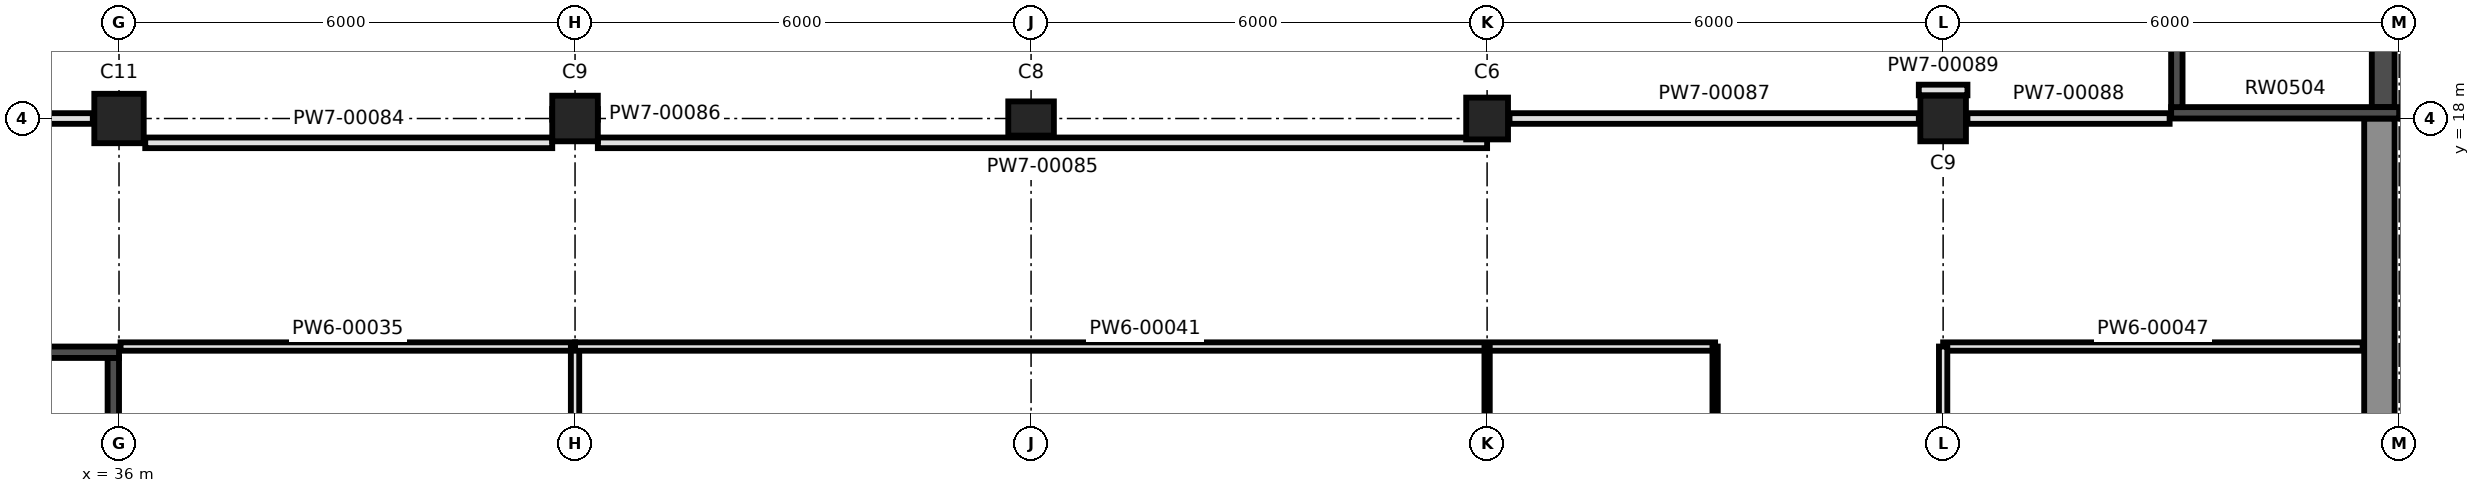
"""IFC4 building model, lengths in metres.
Left out: names, types, materials, properties, quantities, classifications, styles, units other than length and angle.
Written with IfcOpenShell. Run it as: python <this file> out.ifc"""

import sys

from ifc_helpers import new_model, si_unit, direction, frame, frame_2d, origin, origin_2d, place, context, subcontext, project, spatial, rectangle, extrude, element, fill, save


model = new_model("IFC4")
c1 = context("Model", 3, precision=1e-05, world=origin(), true_north=direction((0.0, 1.0)))
c2 = subcontext(c1, "Body", "Model", "MODEL_VIEW")
j1 = project(units=[si_unit("LENGTHUNIT", "METRE"), si_unit("PLANEANGLEUNIT", "RADIAN")], contexts=[c1])
p1 = place(None, origin())
s1 = spatial("IfcSite", under=j1, at=p1, CompositionType="ELEMENT")
p2 = place(p1, origin())
s2 = spatial("IfcBuilding", under=s1, at=p2, CompositionType="ELEMENT")
p3 = place(p2, origin())
s3 = spatial("IfcBuildingStorey", under=s2, at=p3, CompositionType="ELEMENT", Elevation=0.0)
p4 = place(p3, frame((36.0, 18.0, -0.3), z_axis=(0.0, 0.0, 1.0), x_axis=(1.0, 0.0, 0.0)))
e1 = element("IfcColumn", 1, at=p4, inside=s3, PredefinedType="COLUMN", context=c2, shape_type="SweptSolid", body=[
    extrude(rectangle(XDim=0.65, YDim=0.65, at=origin_2d()), origin(), (0.0, 0.0, 1.0), 7.3),
])
p5 = place(p3, frame((42.0, 18.0, -0.3), z_axis=(0.0, 0.0, 1.0), x_axis=(1.0, 0.0, 0.0)))
e2 = element("IfcColumn", 2, at=p5, inside=s3, PredefinedType="COLUMN", context=c2, shape_type="SweptSolid", body=[
    extrude(rectangle(XDim=0.6, YDim=0.6, at=origin_2d()), origin(), (0.0, 0.0, 1.0), 7.3),
])
p6 = place(p3, frame((48.0, 18.0, -0.3), z_axis=(0.0, 0.0, 1.0), x_axis=(1.0, 0.0, 0.0)))
e3 = element("IfcColumn", 3, at=p6, inside=s3, PredefinedType="COLUMN", context=c2, shape_type="SweptSolid", body=[
    extrude(rectangle(XDim=0.6, YDim=0.45, at=origin_2d()), origin(), (0.0, 0.0, 1.0), 7.3),
])
p7 = place(p3, frame((54.0, 18.0, -0.3), z_axis=(0.0, 0.0, 1.0), x_axis=(1.0, 0.0, 0.0)))
e4 = element("IfcColumn", 4, at=p7, inside=s3, PredefinedType="COLUMN", context=c2, shape_type="SweptSolid", body=[
    extrude(rectangle(XDim=0.55, YDim=0.55, at=origin_2d()), origin(), (0.0, 0.0, 1.0), 7.3),
])
p8 = place(p3, frame((60.0, 18.0, -0.3), z_axis=(0.0, 0.0, 1.0), x_axis=(1.0, 0.0, 0.0)))
e5 = element("IfcColumn", 5, at=p8, inside=s3, PredefinedType="COLUMN", context=c2, shape_type="SweptSolid", body=[
    extrude(rectangle(XDim=0.6, YDim=0.6, at=origin_2d()), origin(), (0.0, 0.0, 1.0), 7.3),
])
p9 = place(p3, frame((33.0, 14.925, -0.3), z_axis=(0.0, 0.0, 1.0), x_axis=(1.0, 0.0, 0.0)))
e6 = element("IfcWall", 6, at=p9, inside=s3, PredefinedType="SHEAR", context=c2, shape_type="SweptSolid", body=[
    extrude(rectangle(XDim=3.0, YDim=0.15, at=frame_2d((1.5, 0.0))), origin(), (0.0, 0.0, 1.0), 7.3),
])
p10 = place(p9, frame((1.15, 0.0, 0.3)))
e7 = element("IfcOpeningElement", 7, at=p10, cuts=e6, PredefinedType="OPENING", context=c2, shape_type="SweptSolid", body=[
    extrude(rectangle(XDim=0.6, YDim=2.04, at=frame_2d((0.3, 1.02))), frame((0.0, 0.085, 0.0), z_axis=(0.0, -1.0, 0.0), x_axis=(1.0, 0.0, 0.0)), (0.0, 0.0, 1.0), 0.17),
])
p11 = place(p3, frame((35.925, 12.15, -0.3), z_axis=(0.0, 0.0, 1.0), x_axis=(0.0, 1.0, 0.0)))
e8 = element("IfcWall", 8, at=p11, inside=s3, PredefinedType="SHEAR", context=c2, shape_type="SweptSolid", body=[
    extrude(rectangle(XDim=2.7, YDim=0.15, at=frame_2d((1.35, 0.0))), origin(), (0.0, 0.0, 1.0), 7.3),
])
p12 = place(p3, frame((63.0, 18.075, -0.3), z_axis=(0.0, 0.0, 1.0), x_axis=(1.0, 0.0, 0.0)))
e9 = element("IfcWall", 9, at=p12, inside=s3, PredefinedType="SHEAR", context=c2, shape_type="SweptSolid", body=[
    extrude(rectangle(XDim=3.0, YDim=0.15, at=frame_2d((1.5, 0.0))), origin(), (0.0, 0.0, 1.0), 7.3),
])
p13 = place(p3, frame((63.075, 18.15, -0.3), z_axis=(0.0, 0.0, 1.0), x_axis=(0.0, 1.0, 0.0)))
e10 = element("IfcWall", 10, at=p13, inside=s3, PredefinedType="SHEAR", context=c2, shape_type="SweptSolid", body=[
    extrude(rectangle(XDim=5.7, YDim=0.15, at=frame_2d((2.85, 0.0))), origin(), (0.0, 0.0, 1.0), 7.3),
])
p14 = place(p13, frame((2.5, 0.0, 0.3)))
e11 = element("IfcOpeningElement", 11, at=p14, cuts=e10, PredefinedType="OPENING", context=c2, shape_type="SweptSolid", body=[
    extrude(rectangle(XDim=0.6, YDim=2.04, at=frame_2d((0.3, 1.02))), frame((0.0, 0.085, 0.0), z_axis=(0.0, -1.0, 0.0), x_axis=(1.0, 0.0, 0.0)), (0.0, 0.0, 1.0), 0.17),
])
p15 = place(p3, frame((65.79, 18.15, -0.3), z_axis=(0.0, 0.0, 1.0), x_axis=(0.0, 1.0, 0.0)))
e12 = element("IfcWall", 12, at=p15, inside=s3, PredefinedType="SHEAR", context=c2, shape_type="SweptSolid", body=[
    extrude(rectangle(XDim=5.7, YDim=0.3, at=frame_2d((2.85, 0.0))), origin(), (0.0, 0.0, 1.0), 7.3),
])
p16 = place(p3, frame((65.74, 0.0, -0.3), z_axis=(0.0, 0.0, 1.0), x_axis=(0.0, 1.0, 0.0)))
e13 = element("IfcWall", 13, at=p16, inside=s3, PredefinedType="SOLIDWALL", context=c2, shape_type="SweptSolid", body=[
    extrude(rectangle(XDim=18.0, YDim=0.4, at=frame_2d((9.0, 0.0))), origin(), (0.0, 0.0, 1.0), 7.3),
])
p17 = place(p3, frame((36.02, 15.0, 0.0), z_axis=(0.0, 0.0, 1.0), x_axis=(1.0, 0.0, 0.0)))
e14 = element("IfcWall", 14, at=p17, inside=s3, PredefinedType="PARTITIONING", context=c2, shape_type="SweptSolid", body=[
    extrude(rectangle(XDim=5.98, YDim=0.11, at=frame_2d((2.99, 0.0))), origin(), (0.0, 0.0, 1.0), 6.15),
])
p18 = place(p17, frame((2.53, 0.0, 0.0)))
e15 = element("IfcOpeningElement", 15, at=p18, cuts=e14, PredefinedType="OPENING", context=c2, shape_type="SweptSolid", body=[
    extrude(rectangle(XDim=0.92, YDim=2.04, at=frame_2d((0.46, 1.02))), frame((0.0, 0.065, 0.0), z_axis=(0.0, -1.0, 0.0), x_axis=(1.0, 0.0, 0.0)), (0.0, 0.0, 1.0), 0.13),
])
p19 = place(p3, frame((42.0, 12.32, 0.0), z_axis=(0.0, 0.0, 1.0), x_axis=(0.0, 1.0, 0.0)))
e16 = element("IfcWall", 16, at=p19, inside=s3, PredefinedType="PARTITIONING", context=c2, shape_type="SweptSolid", body=[
    extrude(rectangle(XDim=2.68, YDim=0.11, at=frame_2d((1.34, 0.0))), origin(), (0.0, 0.0, 1.0), 6.15),
])
p20 = place(p3, frame((42.0, 15.0, 0.0), z_axis=(0.0, 0.0, 1.0), x_axis=(1.0, 0.0, 0.0)))
e17 = element("IfcWall", 17, at=p20, inside=s3, PredefinedType="PARTITIONING", context=c2, shape_type="SweptSolid", body=[
    extrude(rectangle(XDim=15.0, YDim=0.11, at=frame_2d((7.5, 0.0))), origin(), (0.0, 0.0, 1.0), 6.15),
])
p21 = place(p20, frame((5.25, 0.0, 0.0)))
e18 = element("IfcOpeningElement", 18, at=p21, cuts=e17, PredefinedType="OPENING", context=c2, shape_type="SweptSolid", body=[
    extrude(rectangle(XDim=1.5, YDim=2.1, at=frame_2d((0.75, 1.05))), frame((0.0, 0.065, 0.0), z_axis=(0.0, -1.0, 0.0), x_axis=(1.0, 0.0, 0.0)), (0.0, 0.0, 1.0), 0.13),
])
p22 = place(p3, frame((60.0, 15.0, 0.0), z_axis=(0.0, 0.0, 1.0), x_axis=(1.0, 0.0, 0.0)))
e19 = element("IfcWall", 19, at=p22, inside=s3, PredefinedType="PARTITIONING", context=c2, shape_type="SweptSolid", body=[
    extrude(rectangle(XDim=5.52, YDim=0.11, at=frame_2d((2.76, 0.0))), origin(), (0.0, 0.0, 1.0), 6.15),
])
p23 = place(p3, frame((60.0, 12.295, 0.0), z_axis=(0.0, 0.0, 1.0), x_axis=(0.0, 1.0, 0.0)))
e20 = element("IfcWall", 20, at=p23, inside=s3, PredefinedType="PARTITIONING", context=c2, shape_type="SweptSolid", body=[
    extrude(rectangle(XDim=2.705, YDim=0.11, at=frame_2d((1.353, 0.0))), origin(), (0.0, 0.0, 1.0), 6.15),
])
p24 = place(p3, frame((30.345, 18.0, 0.0), z_axis=(0.0, 0.0, 1.0), x_axis=(1.0, 0.0, 0.0)))
e21 = element("IfcWall", 21, at=p24, inside=s3, PredefinedType="PARTITIONING", context=c2, shape_type="SweptSolid", body=[
    extrude(rectangle(XDim=5.31, YDim=0.14, at=frame_2d((2.655, 0.0))), origin(), (0.0, 0.0, 1.0), 6.05),
])
p25 = place(p24, frame((1.705, 0.0, 0.0)))
e22 = element("IfcOpeningElement", 22, at=p25, cuts=e21, PredefinedType="OPENING", context=c2, shape_type="SweptSolid", body=[
    extrude(rectangle(XDim=1.8, YDim=2.1, at=frame_2d((0.9, 1.05))), frame((0.0, 0.08, 0.0), z_axis=(0.0, -1.0, 0.0), x_axis=(1.0, 0.0, 0.0)), (0.0, 0.0, 1.0), 0.16),
])
p26 = place(p3, frame((36.345, 17.68, 0.0), z_axis=(0.0, 0.0, 1.0), x_axis=(1.0, 0.0, 0.0)))
e23 = element("IfcWall", 23, at=p26, inside=s3, PredefinedType="PARTITIONING", context=c2, shape_type="SweptSolid", body=[
    extrude(rectangle(XDim=5.355, YDim=0.14, at=frame_2d((2.677, 0.0))), origin(), (0.0, 0.0, 1.0), 6.3),
])
p27 = place(p26, frame((3.205, 0.0, 0.0)))
e24 = element("IfcOpeningElement", 24, at=p27, cuts=e23, PredefinedType="OPENING", context=c2, shape_type="SweptSolid", body=[
    extrude(rectangle(XDim=1.8, YDim=2.1, at=frame_2d((0.9, 1.05))), frame((0.0, 0.08, 0.0), z_axis=(0.0, -1.0, 0.0), x_axis=(1.0, 0.0, 0.0)), (0.0, 0.0, 1.0), 0.16),
])
p28 = place(p3, frame((42.3, 17.68, 0.0), z_axis=(0.0, 0.0, 1.0), x_axis=(1.0, 0.0, 0.0)))
e25 = element("IfcWall", 25, at=p28, inside=s3, PredefinedType="PARTITIONING", context=c2, shape_type="SweptSolid", body=[
    extrude(rectangle(XDim=11.7, YDim=0.14, at=frame_2d((5.85, 0.0))), origin(), (0.0, 0.0, 1.0), 2.75),
])
p29 = place(p28, frame((6.25, 0.0, 0.0)))
e26 = element("IfcOpeningElement", 26, at=p29, cuts=e25, PredefinedType="OPENING", context=c2, shape_type="SweptSolid", body=[
    extrude(rectangle(XDim=1.8, YDim=2.1, at=frame_2d((0.9, 1.05))), frame((0.0, 0.08, 0.0), z_axis=(0.0, -1.0, 0.0), x_axis=(1.0, 0.0, 0.0)), (0.0, 0.0, 1.0), 0.16),
])
p30 = place(p3, frame((41.7, 18.055, 0.0), z_axis=(0.0, 0.0, 1.0), x_axis=(1.0, 0.0, 0.0)))
e27 = element("IfcWall", 27, at=p30, inside=s3, PredefinedType="PARTITIONING", context=c2, shape_type="SweptSolid", body=[
    extrude(rectangle(XDim=0.6, YDim=0.14, at=frame_2d((0.3, 0.0))), origin(), (0.0, 0.0, 1.0), 2.75),
])
p31 = place(p3, frame((54.295, 18.0, 0.0), z_axis=(0.0, 0.0, 1.0), x_axis=(1.0, 0.0, 0.0)))
e28 = element("IfcWall", 28, at=p31, inside=s3, PredefinedType="PARTITIONING", context=c2, shape_type="SweptSolid", body=[
    extrude(rectangle(XDim=5.385, YDim=0.14, at=frame_2d((2.692, 0.0))), origin(), (0.0, 0.0, 1.0), 2.75),
])
p32 = place(p31, frame((3.255, 0.0, 0.0)))
e29 = element("IfcOpeningElement", 29, at=p32, cuts=e28, PredefinedType="OPENING", context=c2, shape_type="SweptSolid", body=[
    extrude(rectangle(XDim=1.8, YDim=2.1, at=frame_2d((0.9, 1.05))), frame((0.0, 0.08, 0.0), z_axis=(0.0, -1.0, 0.0), x_axis=(1.0, 0.0, 0.0)), (0.0, 0.0, 1.0), 0.16),
])
p33 = place(p3, frame((60.32, 18.0, 0.0), z_axis=(0.0, 0.0, 1.0), x_axis=(1.0, 0.0, 0.0)))
e30 = element("IfcWall", 30, at=p33, inside=s3, PredefinedType="PARTITIONING", context=c2, shape_type="SweptSolid", body=[
    extrude(rectangle(XDim=2.66, YDim=0.14, at=frame_2d((1.33, 0.0))), origin(), (0.0, 0.0, 1.0), 6.15),
])
p34 = place(p3, frame((59.68, 18.375, 0.0), z_axis=(0.0, 0.0, 1.0), x_axis=(1.0, 0.0, 0.0)))
e31 = element("IfcWall", 31, at=p34, inside=s3, PredefinedType="PARTITIONING", context=c2, shape_type="SweptSolid", body=[
    extrude(rectangle(XDim=0.64, YDim=0.14, at=frame_2d((0.32, 0.0))), origin(), (0.0, 0.0, 1.0), 6.15),
])
p35 = place(p3, frame((54.0, 12.295, 0.0), z_axis=(0.0, 0.0, 1.0), x_axis=(0.0, 1.0, 0.0)))
e32 = element("IfcWall", 32, at=p35, inside=s3, PredefinedType="PARTITIONING", context=c2, shape_type="SweptSolid", body=[
    extrude(rectangle(XDim=2.705, YDim=0.07, at=frame_2d((1.353, 0.0))), origin(), (0.0, 0.0, 1.0), 6.15),
])
p36 = place(p3, frame((57.0, 10.0, 0.0), z_axis=(0.0, 0.0, 1.0), x_axis=(0.0, 1.0, 0.0)))
e33 = element("IfcWall", 33, at=p36, inside=s3, PredefinedType="PARTITIONING", context=c2, shape_type="SweptSolid", body=[
    extrude(rectangle(XDim=5.0, YDim=0.07, at=frame_2d((2.5, 0.0))), origin(), (0.0, 0.0, 1.0), 6.15),
])
p37 = place(p36, frame((2.05, 0.0, 0.0)))
e34 = element("IfcOpeningElement", 34, at=p37, cuts=e33, PredefinedType="OPENING", context=c2, shape_type="SweptSolid", body=[
    extrude(rectangle(XDim=0.92, YDim=2.04, at=frame_2d((0.46, 1.02))), frame((0.0, 0.045, 0.0), z_axis=(0.0, -1.0, 0.0), x_axis=(1.0, 0.0, 0.0)), (0.0, 0.0, 1.0), 0.09),
])
p38 = place(p18, frame((0.92, 0.0, 0.0), z_axis=(0.0, 0.0, 1.0), x_axis=(-1.0, 0.0, 0.0)))
e35 = element("IfcDoor", 35, at=p38, inside=s3, OperationType="SINGLE_SWING_LEFT", PredefinedType="DOOR", context=c2, shape_type="SweptSolid", body=[
    extrude(rectangle(XDim=0.92, YDim=2.04, at=frame_2d((0.46, 1.02))), frame((0.0, 0.025, 0.0), z_axis=(0.0, -1.0, 0.0), x_axis=(1.0, 0.0, 0.0)), (0.0, 0.0, 1.0), 0.05),
])
fill(e15, e35)
p39 = place(p21, origin())
e36 = element("IfcDoor", 36, at=p39, inside=s3, OperationType="DOUBLE_DOOR_SINGLE_SWING", PredefinedType="DOOR", context=c2, shape_type="SweptSolid", body=[
    extrude(rectangle(XDim=1.5, YDim=2.1, at=frame_2d((0.75, 1.05))), frame((0.0, 0.025, 0.0), z_axis=(0.0, -1.0, 0.0), x_axis=(1.0, 0.0, 0.0)), (0.0, 0.0, 1.0), 0.05),
])
fill(e18, e36)
p40 = place(p27, origin())
e37 = element("IfcDoor", 37, at=p40, inside=s3, OperationType="DOUBLE_DOOR_SINGLE_SWING", PredefinedType="DOOR", context=c2, shape_type="SweptSolid", body=[
    extrude(rectangle(XDim=1.8, YDim=2.1, at=frame_2d((0.9, 1.05))), frame((0.0, 0.025, 0.0), z_axis=(0.0, -1.0, 0.0), x_axis=(1.0, 0.0, 0.0)), (0.0, 0.0, 1.0), 0.05),
])
fill(e24, e37)
p41 = place(p29, origin())
e38 = element("IfcDoor", 38, at=p41, inside=s3, OperationType="DOUBLE_DOOR_SINGLE_SWING", PredefinedType="DOOR", context=c2, shape_type="SweptSolid", body=[
    extrude(rectangle(XDim=1.8, YDim=2.1, at=frame_2d((0.9, 1.05))), frame((0.0, 0.025, 0.0), z_axis=(0.0, -1.0, 0.0), x_axis=(1.0, 0.0, 0.0)), (0.0, 0.0, 1.0), 0.05),
])
fill(e26, e38)
p42 = place(p32, origin())
e39 = element("IfcDoor", 39, at=p42, inside=s3, OperationType="DOUBLE_DOOR_SINGLE_SWING", PredefinedType="DOOR", context=c2, shape_type="SweptSolid", body=[
    extrude(rectangle(XDim=1.8, YDim=2.1, at=frame_2d((0.9, 1.05))), frame((0.0, 0.025, 0.0), z_axis=(0.0, -1.0, 0.0), x_axis=(1.0, 0.0, 0.0)), (0.0, 0.0, 1.0), 0.05),
])
fill(e29, e39)
save(model, sys.argv[1])
